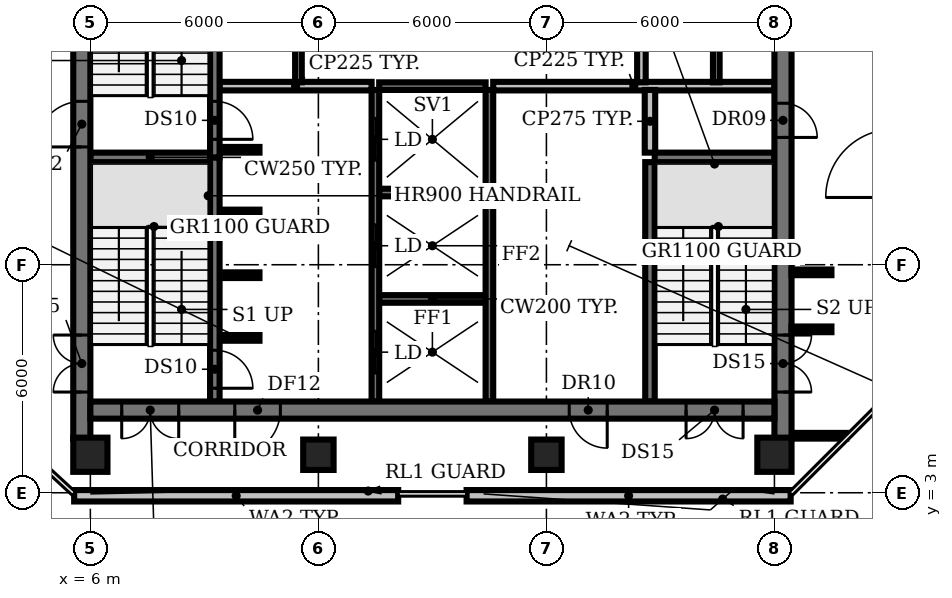
"""IFC4 building model, lengths in metres.
Left out: names, types, materials, properties, quantities, classifications, styles, units other than length and angle.
Written with IfcOpenShell. Run it as: python <this file> out.ifc"""

import sys

from ifc_helpers import new_model, si_unit, direction, frame, frame_2d, origin, origin_2d, place, context, subcontext, project, spatial, rectangle, circle, extrude, element, fill, save


model = new_model("IFC4")
c1 = context("Model", 3, precision=1e-05, world=origin(), true_north=direction((0.0, 1.0)))
c2 = subcontext(c1, "Body", "Model", "MODEL_VIEW")
j1 = project(units=[si_unit("LENGTHUNIT", "METRE"), si_unit("PLANEANGLEUNIT", "RADIAN")], contexts=[c1])
p1 = place(None, origin())
s1 = spatial("IfcSite", under=j1, at=p1, CompositionType="ELEMENT")
p2 = place(p1, origin())
s2 = spatial("IfcBuilding", under=s1, at=p2, CompositionType="ELEMENT")
p3 = place(p2, frame((0.0, 0.0, 243.2)))
s3 = spatial("IfcBuildingStorey", under=s2, at=p3, CompositionType="ELEMENT", Elevation=243.2)
p4 = place(p3, frame((6.0, 4.0, 0.0), z_axis=(0.0, 0.0, 1.0), x_axis=(1.0, 0.0, 0.0)))
e1 = element("IfcColumn", 1, at=p4, inside=s3, PredefinedType="COLUMN", context=c2, shape_type="SweptSolid", body=[
    extrude(circle(Radius=0.45, at=origin_2d()), origin(), (0.0, 0.0, 1.0), 3.85),
])
for number, where, z_axis, x_axis in (
    (2, (12.0, 4.0, 0.0), (0.0, 0.0, 1.0), (1.0, 0.0, 0.0)),
    (3, (18.0, 4.0, 0.0), (0.0, 0.0, 1.0), (1.0, 0.0, 0.0)),
):
    element("IfcColumn", number, at=place(p3, frame(where, z_axis=z_axis, x_axis=x_axis)), inside=s3, PredefinedType="COLUMN", context=c2, shape_type="SweptSolid", body=[
        extrude(rectangle(XDim=0.8, YDim=0.8, at=origin_2d()), origin(), (0.0, 0.0, 1.0), 3.85),
    ])
p5 = place(p3, frame((24.0, 4.0, 0.0), z_axis=(0.0, 0.0, 1.0), x_axis=(1.0, 0.0, 0.0)))
e4 = element("IfcColumn", 4, at=p5, inside=s3, PredefinedType="COLUMN", context=c2, shape_type="SweptSolid", body=[
    extrude(circle(Radius=0.45, at=origin_2d()), origin(), (0.0, 0.0, 1.0), 3.85),
])
for number, where, z_axis, x_axis in (
    (5, (5.573, 2.92, 0.0), (0.0, 0.0, 1.0), (1.0, 0.0, 0.0)),
    (6, (15.9, 2.92, 0.0), (0.0, 0.0, 1.0), (1.0, 0.0, 0.0)),
):
    element("IfcWall", number, at=place(p3, frame(where, z_axis=z_axis, x_axis=x_axis)), inside=s3, PredefinedType="SOLIDWALL", context=c2, shape_type="SweptSolid", body=[
        extrude(rectangle(XDim=8.527, YDim=0.3, at=frame_2d((4.263, 0.0))), origin(), (0.0, 0.0, 1.0), 3.85),
    ])
p6 = place(p3, frame((9.4, 7.075, 0.0), z_axis=(0.0, 0.0, 1.0), x_axis=(1.0, 0.0, 0.0)))
e7 = element("IfcWall", 7, at=p6, inside=s3, PredefinedType="SHEAR", context=c2, shape_type="SweptSolid", body=[
    extrude(rectangle(XDim=1.05, YDim=0.15, at=frame_2d((0.525, 0.0))), origin(), (0.0, 0.0, 1.0), 3.85),
])
p7 = place(p3, frame((13.6, 8.1, 0.0), z_axis=(0.0, 0.0, 1.0), x_axis=(1.0, 0.0, 0.0)))
e8 = element("IfcWall", 8, at=p7, inside=s3, PredefinedType="SHEAR", context=c2, shape_type="SweptSolid", body=[
    extrude(rectangle(XDim=2.8, YDim=0.2, at=frame_2d((1.4, 0.0))), origin(), (0.0, 0.0, 1.0), 3.85),
])
for number, where, z_axis, x_axis in (
    (9, (9.4, 8.725, 0.0), (0.0, 0.0, 1.0), (1.0, 0.0, 0.0)),
    (10, (9.4, 10.375, 0.0), (0.0, 0.0, 1.0), (1.0, 0.0, 0.0)),
):
    element("IfcWall", number, at=place(p3, frame(where, z_axis=z_axis, x_axis=x_axis)), inside=s3, PredefinedType="SHEAR", context=c2, shape_type="SweptSolid", body=[
        extrude(rectangle(XDim=1.05, YDim=0.15, at=frame_2d((0.525, 0.0))), origin(), (0.0, 0.0, 1.0), 3.85),
    ])
p8 = place(p3, frame((13.6, 10.9, 0.0), z_axis=(0.0, 0.0, 1.0), x_axis=(1.0, 0.0, 0.0)))
e11 = element("IfcWall", 11, at=p8, inside=s3, PredefinedType="SHEAR", context=c2, shape_type="SweptSolid", body=[
    extrude(rectangle(XDim=2.8, YDim=0.2, at=frame_2d((1.4, 0.0))), origin(), (0.0, 0.0, 1.0), 3.85),
])
for number, where, z_axis, x_axis in (
    (12, (6.0, 11.825, 0.0), (0.0, 0.0, 1.0), (1.0, 0.0, 0.0)),
    (13, (20.85, 11.825, 0.0), (0.0, 0.0, 1.0), (1.0, 0.0, 0.0)),
):
    element("IfcWall", number, at=place(p3, frame(where, z_axis=z_axis, x_axis=x_axis)), inside=s3, PredefinedType="SHEAR", context=c2, shape_type="SweptSolid", body=[
        extrude(rectangle(XDim=3.15, YDim=0.25, at=frame_2d((1.575, 0.0))), origin(), (0.0, 0.0, 1.0), 3.85),
    ])
p9 = place(p3, frame((9.4, 12.025, 0.0), z_axis=(0.0, 0.0, 1.0), x_axis=(1.0, 0.0, 0.0)))
e14 = element("IfcWall", 14, at=p9, inside=s3, PredefinedType="SHEAR", context=c2, shape_type="SweptSolid", body=[
    extrude(rectangle(XDim=1.05, YDim=0.15, at=frame_2d((0.525, 0.0))), origin(), (0.0, 0.0, 1.0), 3.85),
])
p10 = place(p3, frame((9.4, 13.7, 0.0), z_axis=(0.0, 0.0, 1.0), x_axis=(1.0, 0.0, 0.0)))
e15 = element("IfcWall", 15, at=p10, inside=s3, PredefinedType="PARTITIONING", context=c2, shape_type="SweptSolid", body=[
    extrude(rectangle(XDim=4.0, YDim=0.225, at=frame_2d((2.0, 0.0))), origin(), (0.0, 0.0, 1.0), 3.85),
])
p11 = place(p3, frame((13.6, 13.7, 0.0), z_axis=(0.0, 0.0, 1.0), x_axis=(1.0, 0.0, 0.0)))
e16 = element("IfcWall", 16, at=p11, inside=s3, PredefinedType="SHEAR", context=c2, shape_type="SweptSolid", body=[
    extrude(rectangle(XDim=2.8, YDim=0.2, at=frame_2d((1.4, 0.0))), origin(), (0.0, 0.0, 1.0), 3.85),
])
p12 = place(p3, frame((16.6, 13.7, 0.0), z_axis=(0.0, 0.0, 1.0), x_axis=(1.0, 0.0, 0.0)))
e17 = element("IfcWall", 17, at=p12, inside=s3, PredefinedType="PARTITIONING", context=c2, shape_type="SweptSolid", body=[
    extrude(rectangle(XDim=7.4, YDim=0.225, at=frame_2d((3.7, 0.0))), origin(), (0.0, 0.0, 1.0), 3.85),
])
p13 = place(p3, frame((9.275, 11.825, 0.0), z_axis=(0.0, 0.0, 1.0), x_axis=(0.0, -1.0, 0.0)))
e18 = element("IfcWall", 18, at=p13, inside=s3, PredefinedType="SHEAR", context=c2, shape_type="SweptSolid", body=[
    extrude(rectangle(XDim=6.425, YDim=0.25, at=frame_2d((3.212, 0.0))), origin(), (0.0, 0.0, 1.0), 3.85),
])
p14 = place(p13, frame((5.075, 0.0, 0.0)))
e19 = element("IfcOpeningElement", 19, at=p14, cuts=e18, PredefinedType="OPENING", context=c2, shape_type="SweptSolid", body=[
    extrude(rectangle(XDim=1.0, YDim=2.1, at=frame_2d((0.5, 1.05))), frame((0.0, 0.135, 0.0), z_axis=(0.0, -1.0, 0.0), x_axis=(1.0, 0.0, 0.0)), (0.0, 0.0, 1.0), 0.27),
])
p15 = place(p3, frame((9.275, 18.375, 0.0), z_axis=(0.0, 0.0, 1.0), x_axis=(0.0, -1.0, 0.0)))
e20 = element("IfcWall", 20, at=p15, inside=s3, PredefinedType="SHEAR", context=c2, shape_type="SweptSolid", body=[
    extrude(rectangle(XDim=6.55, YDim=0.25, at=frame_2d((3.275, 0.0))), origin(), (0.0, 0.0, 1.0), 3.85),
])
p16 = place(p15, frame((5.075, 0.0, 0.0)))
e21 = element("IfcOpeningElement", 21, at=p16, cuts=e20, PredefinedType="OPENING", context=c2, shape_type="SweptSolid", body=[
    extrude(rectangle(XDim=1.0, YDim=2.1, at=frame_2d((0.5, 1.05))), frame((0.0, 0.135, 0.0), z_axis=(0.0, -1.0, 0.0), x_axis=(1.0, 0.0, 0.0)), (0.0, 0.0, 1.0), 0.27),
])
p17 = place(p3, frame((11.475, 13.8, 0.0), z_axis=(0.0, 0.0, 1.0), x_axis=(0.0, 1.0, 0.0)))
e22 = element("IfcWall", 22, at=p17, inside=s3, PredefinedType="PARTITIONING", context=c2, shape_type="SweptSolid", body=[
    extrude(rectangle(XDim=2.6, YDim=0.175, at=frame_2d((1.3, 0.0))), origin(), (0.0, 0.0, 1.0), 3.85),
])
p18 = place(p3, frame((13.5, 5.4, 0.0), z_axis=(0.0, 0.0, 1.0), x_axis=(0.0, 1.0, 0.0)))
e23 = element("IfcWall", 23, at=p18, inside=s3, PredefinedType="SHEAR", context=c2, shape_type="SweptSolid", body=[
    extrude(rectangle(XDim=8.2, YDim=0.2, at=frame_2d((4.1, 0.0))), origin(), (0.0, 0.0, 1.0), 3.85),
])
p19 = place(p18, frame((0.75, 0.0, 0.0)))
e24 = element("IfcOpeningElement", 24, at=p19, cuts=e23, PredefinedType="OPENING", context=c2, shape_type="SweptSolid", body=[
    extrude(rectangle(XDim=1.1, YDim=2.1, at=frame_2d((0.55, 1.05))), frame((0.0, 0.11, 0.0), z_axis=(0.0, -1.0, 0.0), x_axis=(1.0, 0.0, 0.0)), (0.0, 0.0, 1.0), 0.22),
])
p20 = place(p18, frame((3.55, 0.0, 0.0)))
e25 = element("IfcOpeningElement", 25, at=p20, cuts=e23, PredefinedType="OPENING", context=c2, shape_type="SweptSolid", body=[
    extrude(rectangle(XDim=1.1, YDim=2.1, at=frame_2d((0.55, 1.05))), frame((0.0, 0.11, 0.0), z_axis=(0.0, -1.0, 0.0), x_axis=(1.0, 0.0, 0.0)), (0.0, 0.0, 1.0), 0.22),
])
p21 = place(p18, frame((6.35, 0.0, 0.0)))
e26 = element("IfcOpeningElement", 26, at=p21, cuts=e23, PredefinedType="OPENING", context=c2, shape_type="SweptSolid", body=[
    extrude(rectangle(XDim=1.1, YDim=2.1, at=frame_2d((0.55, 1.05))), frame((0.0, 0.11, 0.0), z_axis=(0.0, -1.0, 0.0), x_axis=(1.0, 0.0, 0.0)), (0.0, 0.0, 1.0), 0.22),
])
p22 = place(p3, frame((16.5, 5.4, 0.0), z_axis=(0.0, 0.0, 1.0), x_axis=(0.0, 1.0, 0.0)))
e27 = element("IfcWall", 27, at=p22, inside=s3, PredefinedType="SHEAR", context=c2, shape_type="SweptSolid", body=[
    extrude(rectangle(XDim=8.2, YDim=0.2, at=frame_2d((4.1, 0.0))), origin(), (0.0, 0.0, 1.0), 3.85),
])
p23 = place(p3, frame((20.5, 13.8, 0.0), z_axis=(0.0, 0.0, 1.0), x_axis=(0.0, 1.0, 0.0)))
e28 = element("IfcWall", 28, at=p23, inside=s3, PredefinedType="PARTITIONING", context=c2, shape_type="SweptSolid", body=[
    extrude(rectangle(XDim=2.6, YDim=0.225, at=frame_2d((1.3, 0.0))), origin(), (0.0, 0.0, 1.0), 3.85),
])
p24 = place(p3, frame((20.725, 5.4, 0.0), z_axis=(0.0, 0.0, 1.0), x_axis=(0.0, 1.0, 0.0)))
e29 = element("IfcWall", 29, at=p24, inside=s3, PredefinedType="SHEAR", context=c2, shape_type="SweptSolid", body=[
    extrude(rectangle(XDim=6.3, YDim=0.25, at=frame_2d((3.15, 0.0))), origin(), (0.0, 0.0, 1.0), 3.85),
])
p25 = place(p3, frame((20.725, 11.95, 0.0), z_axis=(0.0, 0.0, 1.0), x_axis=(0.0, 1.0, 0.0)))
e30 = element("IfcWall", 30, at=p25, inside=s3, PredefinedType="PARTITIONING", context=c2, shape_type="SweptSolid", body=[
    extrude(rectangle(XDim=1.65, YDim=0.275, at=frame_2d((0.825, 0.0))), origin(), (0.0, 0.0, 1.0), 3.85),
])
p26 = place(p3, frame((22.47, 13.8, 0.0), z_axis=(0.0, 0.0, 1.0), x_axis=(0.0, 1.0, 0.0)))
e31 = element("IfcWall", 31, at=p26, inside=s3, PredefinedType="PARTITIONING", context=c2, shape_type="SweptSolid", body=[
    extrude(rectangle(XDim=2.6, YDim=0.175, at=frame_2d((1.3, 0.0))), origin(), (0.0, 0.0, 1.0), 3.85),
])
p27 = place(p3, frame((5.775, 4.42, 0.0), z_axis=(0.0, 0.0, 1.0), x_axis=(0.0, 1.0, 0.0)))
e32 = element("IfcWall", 32, at=p27, inside=s3, PredefinedType="SHEAR", context=c2, shape_type="SweptSolid", body=[
    extrude(rectangle(XDim=20.83, YDim=0.45, at=frame_2d((10.415, 0.0))), origin(), (0.0, 0.0, 1.0), 3.85),
])
p28 = place(p27, frame((1.23, 0.0, 0.0)))
e33 = element("IfcOpeningElement", 33, at=p28, cuts=e32, PredefinedType="OPENING", context=c2, shape_type="SweptSolid", body=[
    extrude(rectangle(XDim=1.5, YDim=2.1, at=frame_2d((0.75, 1.05))), frame((0.0, 0.235, 0.0), z_axis=(0.0, -1.0, 0.0), x_axis=(1.0, 0.0, 0.0)), (0.0, 0.0, 1.0), 0.47),
])
p29 = place(p27, frame((7.68, 0.0, 0.0)))
e34 = element("IfcOpeningElement", 34, at=p29, cuts=e32, PredefinedType="OPENING", context=c2, shape_type="SweptSolid", body=[
    extrude(rectangle(XDim=1.2, YDim=2.1, at=frame_2d((0.6, 1.05))), frame((0.0, 0.235, 0.0), z_axis=(0.0, -1.0, 0.0), x_axis=(1.0, 0.0, 0.0)), (0.0, 0.0, 1.0), 0.47),
])
p30 = place(p27, frame((14.23, 0.0, 0.0)))
e35 = element("IfcOpeningElement", 35, at=p30, cuts=e32, PredefinedType="OPENING", context=c2, shape_type="SweptSolid", body=[
    extrude(rectangle(XDim=1.2, YDim=2.1, at=frame_2d((0.6, 1.05))), frame((0.0, 0.235, 0.0), z_axis=(0.0, -1.0, 0.0), x_axis=(1.0, 0.0, 0.0)), (0.0, 0.0, 1.0), 0.47),
])
p31 = place(p3, frame((24.225, 25.25, 0.0), z_axis=(0.0, 0.0, 1.0), x_axis=(0.0, -1.0, 0.0)))
e36 = element("IfcWall", 36, at=p31, inside=s3, PredefinedType="SHEAR", context=c2, shape_type="SweptSolid", body=[
    extrude(rectangle(XDim=20.83, YDim=0.45, at=frame_2d((10.415, 0.0))), origin(), (0.0, 0.0, 1.0), 3.85),
])
p32 = place(p31, frame((18.1, 0.0, 0.0)))
e37 = element("IfcOpeningElement", 37, at=p32, cuts=e36, PredefinedType="OPENING", context=c2, shape_type="SweptSolid", body=[
    extrude(rectangle(XDim=1.5, YDim=2.1, at=frame_2d((0.75, 1.05))), frame((0.0, 0.235, 0.0), z_axis=(0.0, -1.0, 0.0), x_axis=(1.0, 0.0, 0.0)), (0.0, 0.0, 1.0), 0.47),
])
p33 = place(p31, frame((12.0, 0.0, 0.0)))
e38 = element("IfcOpeningElement", 38, at=p33, cuts=e36, PredefinedType="OPENING", context=c2, shape_type="SweptSolid", body=[
    extrude(rectangle(XDim=0.9, YDim=2.1, at=frame_2d((0.45, 1.05))), frame((0.0, 0.235, 0.0), z_axis=(0.0, -1.0, 0.0), x_axis=(1.0, 0.0, 0.0)), (0.0, 0.0, 1.0), 0.47),
])
p34 = place(p31, frame((6.0, 0.0, 0.0)))
e39 = element("IfcOpeningElement", 39, at=p34, cuts=e36, PredefinedType="OPENING", context=c2, shape_type="SweptSolid", body=[
    extrude(rectangle(XDim=2.0, YDim=2.1, at=frame_2d((1.0, 1.05))), frame((0.0, 0.235, 0.0), z_axis=(0.0, -1.0, 0.0), x_axis=(1.0, 0.0, 0.0)), (0.0, 0.0, 1.0), 0.47),
])
p35 = place(p3, frame((24.0, 5.175, 0.0), z_axis=(0.0, 0.0, 1.0), x_axis=(-1.0, 0.0, 0.0)))
e40 = element("IfcWall", 40, at=p35, inside=s3, PredefinedType="SHEAR", context=c2, shape_type="SweptSolid", body=[
    extrude(rectangle(XDim=18.0, YDim=0.45, at=frame_2d((9.0, 0.0))), origin(), (0.0, 0.0, 1.0), 3.85),
])
p36 = place(p35, frame((0.825, 0.0, 0.0)))
e41 = element("IfcOpeningElement", 41, at=p36, cuts=e40, PredefinedType="OPENING", context=c2, shape_type="SweptSolid", body=[
    extrude(rectangle(XDim=1.5, YDim=2.1, at=frame_2d((0.75, 1.05))), frame((0.0, 0.235, 0.0), z_axis=(0.0, -1.0, 0.0), x_axis=(1.0, 0.0, 0.0)), (0.0, 0.0, 1.0), 0.47),
])
p37 = place(p35, frame((15.675, 0.0, 0.0)))
e42 = element("IfcOpeningElement", 42, at=p37, cuts=e40, PredefinedType="OPENING", context=c2, shape_type="SweptSolid", body=[
    extrude(rectangle(XDim=1.5, YDim=2.1, at=frame_2d((0.75, 1.05))), frame((0.0, 0.235, 0.0), z_axis=(0.0, -1.0, 0.0), x_axis=(1.0, 0.0, 0.0)), (0.0, 0.0, 1.0), 0.47),
])
p38 = place(p35, frame((13.0, 0.0, 0.0)))
e43 = element("IfcOpeningElement", 43, at=p38, cuts=e40, PredefinedType="OPENING", context=c2, shape_type="SweptSolid", body=[
    extrude(rectangle(XDim=1.2, YDim=2.1, at=frame_2d((0.6, 1.05))), frame((0.0, 0.235, 0.0), z_axis=(0.0, -1.0, 0.0), x_axis=(1.0, 0.0, 0.0)), (0.0, 0.0, 1.0), 0.47),
])
p39 = place(p35, frame((4.4, 0.0, 0.0)))
e44 = element("IfcOpeningElement", 44, at=p39, cuts=e40, PredefinedType="OPENING", context=c2, shape_type="SweptSolid", body=[
    extrude(rectangle(XDim=1.0, YDim=2.1, at=frame_2d((0.5, 1.05))), frame((0.0, 0.235, 0.0), z_axis=(0.0, -1.0, 0.0), x_axis=(1.0, 0.0, 0.0)), (0.0, 0.0, 1.0), 0.47),
])
for number, where, z_axis, x_axis in (
    (45, (24.45, 7.3, 0.0), (0.0, 0.0, 1.0), (1.0, 0.0, 0.0)),
    (46, (24.45, 8.8, 0.0), (0.0, 0.0, 1.0), (1.0, 0.0, 0.0)),
):
    element("IfcWall", number, at=place(p3, frame(where, z_axis=z_axis, x_axis=x_axis)), inside=s3, PredefinedType="PARTITIONING", context=c2, shape_type="SweptSolid", body=[
        extrude(rectangle(XDim=1.05, YDim=0.15, at=frame_2d((0.525, 0.0))), origin(), (0.0, 0.0, 1.0), 2.88),
    ])
p40 = place(p3, frame((24.55, 4.5, 0.0), z_axis=(0.0, 0.0, 1.0), x_axis=(1.0, 0.0, 0.0)))
e47 = element("IfcWall", 47, at=p40, inside=s3, PredefinedType="PARTITIONING", context=c2, shape_type="SweptSolid", body=[
    extrude(rectangle(XDim=1.34, YDim=0.15, at=frame_2d((0.67, 0.0))), origin(), (0.0, 0.0, 1.0), 2.88),
])
p41 = place(p14, origin())
e48 = element("IfcDoor", 48, at=p41, inside=s3, OperationType="SINGLE_SWING_RIGHT", PredefinedType="DOOR", context=c2, shape_type="SweptSolid", body=[
    extrude(rectangle(XDim=1.0, YDim=2.1, at=frame_2d((0.5, 1.05))), frame((0.0, 0.025, 0.0), z_axis=(0.0, -1.0, 0.0), x_axis=(1.0, 0.0, 0.0)), (0.0, 0.0, 1.0), 0.05),
])
fill(e19, e48)
p42 = place(p16, origin())
e49 = element("IfcDoor", 49, at=p42, inside=s3, OperationType="SINGLE_SWING_RIGHT", PredefinedType="DOOR", context=c2, shape_type="SweptSolid", body=[
    extrude(rectangle(XDim=1.0, YDim=2.1, at=frame_2d((0.5, 1.05))), frame((0.0, 0.025, 0.0), z_axis=(0.0, -1.0, 0.0), x_axis=(1.0, 0.0, 0.0)), (0.0, 0.0, 1.0), 0.05),
])
fill(e21, e49)
p43 = place(p19, origin())
e50 = element("IfcDoor", 50, at=p43, inside=s3, OperationType="DOUBLE_DOOR_SLIDING", PredefinedType="DOOR", context=c2, shape_type="SweptSolid", body=[
    extrude(rectangle(XDim=1.1, YDim=2.1, at=frame_2d((0.55, 1.05))), frame((0.0, 0.025, 0.0), z_axis=(0.0, -1.0, 0.0), x_axis=(1.0, 0.0, 0.0)), (0.0, 0.0, 1.0), 0.05),
])
fill(e24, e50)
p44 = place(p20, origin())
e51 = element("IfcDoor", 51, at=p44, inside=s3, OperationType="DOUBLE_DOOR_SLIDING", PredefinedType="DOOR", context=c2, shape_type="SweptSolid", body=[
    extrude(rectangle(XDim=1.1, YDim=2.1, at=frame_2d((0.55, 1.05))), frame((0.0, 0.025, 0.0), z_axis=(0.0, -1.0, 0.0), x_axis=(1.0, 0.0, 0.0)), (0.0, 0.0, 1.0), 0.05),
])
fill(e25, e51)
p45 = place(p21, origin())
e52 = element("IfcDoor", 52, at=p45, inside=s3, OperationType="DOUBLE_DOOR_SLIDING", PredefinedType="DOOR", context=c2, shape_type="SweptSolid", body=[
    extrude(rectangle(XDim=1.1, YDim=2.1, at=frame_2d((0.55, 1.05))), frame((0.0, 0.025, 0.0), z_axis=(0.0, -1.0, 0.0), x_axis=(1.0, 0.0, 0.0)), (0.0, 0.0, 1.0), 0.05),
])
fill(e26, e52)
p46 = place(p28, origin())
e53 = element("IfcDoor", 53, at=p46, inside=s3, OperationType="DOUBLE_DOOR_SINGLE_SWING", PredefinedType="DOOR", context=c2, shape_type="SweptSolid", body=[
    extrude(rectangle(XDim=1.5, YDim=2.1, at=frame_2d((0.75, 1.05))), frame((0.0, 0.025, 0.0), z_axis=(0.0, -1.0, 0.0), x_axis=(1.0, 0.0, 0.0)), (0.0, 0.0, 1.0), 0.05),
])
fill(e33, e53)
p47 = place(p29, origin())
e54 = element("IfcDoor", 54, at=p47, inside=s3, OperationType="SINGLE_SWING_LEFT", PredefinedType="DOOR", context=c2, shape_type="SweptSolid", body=[
    extrude(rectangle(XDim=1.2, YDim=2.1, at=frame_2d((0.6, 1.05))), frame((0.0, 0.025, 0.0), z_axis=(0.0, -1.0, 0.0), x_axis=(1.0, 0.0, 0.0)), (0.0, 0.0, 1.0), 0.05),
])
fill(e34, e54)
p48 = place(p32, origin())
e55 = element("IfcDoor", 55, at=p48, inside=s3, OperationType="DOUBLE_DOOR_SINGLE_SWING", PredefinedType="DOOR", context=c2, shape_type="SweptSolid", body=[
    extrude(rectangle(XDim=1.5, YDim=2.1, at=frame_2d((0.75, 1.05))), frame((0.0, 0.025, 0.0), z_axis=(0.0, -1.0, 0.0), x_axis=(1.0, 0.0, 0.0)), (0.0, 0.0, 1.0), 0.05),
])
fill(e37, e55)
p49 = place(p33, origin())
e56 = element("IfcDoor", 56, at=p49, inside=s3, OperationType="SINGLE_SWING_RIGHT", PredefinedType="DOOR", context=c2, shape_type="SweptSolid", body=[
    extrude(rectangle(XDim=0.9, YDim=2.1, at=frame_2d((0.45, 1.05))), frame((0.0, 0.025, 0.0), z_axis=(0.0, -1.0, 0.0), x_axis=(1.0, 0.0, 0.0)), (0.0, 0.0, 1.0), 0.05),
])
fill(e38, e56)
p50 = place(p36, origin())
e57 = element("IfcDoor", 57, at=p50, inside=s3, OperationType="DOUBLE_DOOR_SINGLE_SWING", PredefinedType="DOOR", context=c2, shape_type="SweptSolid", body=[
    extrude(rectangle(XDim=1.5, YDim=2.1, at=frame_2d((0.75, 1.05))), frame((0.0, 0.025, 0.0), z_axis=(0.0, -1.0, 0.0), x_axis=(1.0, 0.0, 0.0)), (0.0, 0.0, 1.0), 0.05),
])
fill(e41, e57)
p51 = place(p37, origin())
e58 = element("IfcDoor", 58, at=p51, inside=s3, OperationType="DOUBLE_DOOR_SINGLE_SWING", PredefinedType="DOOR", context=c2, shape_type="SweptSolid", body=[
    extrude(rectangle(XDim=1.5, YDim=2.1, at=frame_2d((0.75, 1.05))), frame((0.0, 0.025, 0.0), z_axis=(0.0, -1.0, 0.0), x_axis=(1.0, 0.0, 0.0)), (0.0, 0.0, 1.0), 0.05),
])
fill(e42, e58)
p52 = place(p38, origin())
e59 = element("IfcDoor", 59, at=p52, inside=s3, OperationType="SINGLE_SWING_RIGHT", PredefinedType="DOOR", context=c2, shape_type="SweptSolid", body=[
    extrude(rectangle(XDim=1.2, YDim=2.1, at=frame_2d((0.6, 1.05))), frame((0.0, 0.025, 0.0), z_axis=(0.0, -1.0, 0.0), x_axis=(1.0, 0.0, 0.0)), (0.0, 0.0, 1.0), 0.05),
])
fill(e43, e59)
p53 = place(p39, origin())
e60 = element("IfcDoor", 60, at=p53, inside=s3, OperationType="SINGLE_SWING_LEFT", PredefinedType="DOOR", context=c2, shape_type="SweptSolid", body=[
    extrude(rectangle(XDim=1.0, YDim=2.1, at=frame_2d((0.5, 1.05))), frame((0.0, 0.025, 0.0), z_axis=(0.0, -1.0, 0.0), x_axis=(1.0, 0.0, 0.0)), (0.0, 0.0, 1.0), 0.05),
])
fill(e44, e60)
save(model, sys.argv[1])
